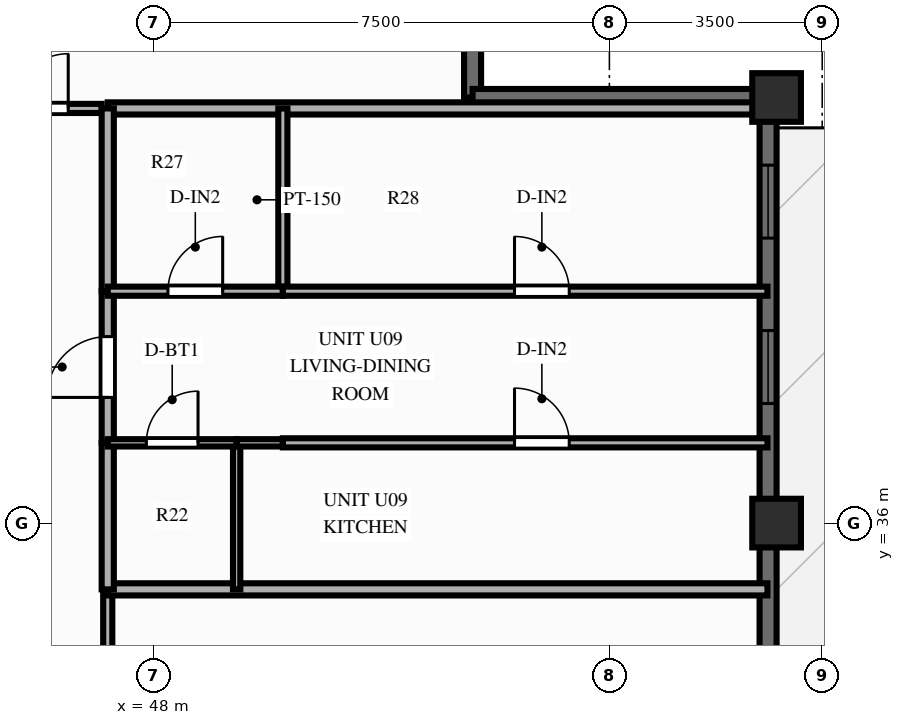
"""IFC4 building model, lengths in metres.
Left out: names, types, materials, properties, quantities, classifications, styles, units other than length and angle.
Written with IfcOpenShell. Run it as: python <this file> out.ifc"""

import sys

from ifc_helpers import new_model, si_unit, direction, frame, frame_2d, origin, origin_2d, place, context, subcontext, project, spatial, rectangle, extrude, source, transform, mapped, element, fill, save


model = new_model("IFC4")
c1 = context("Model", 3, precision=1e-05, world=origin(), true_north=direction((0.0, 1.0)))
c2 = subcontext(c1, "Body", "Model", "MODEL_VIEW")
j1 = project(units=[si_unit("LENGTHUNIT", "METRE"), si_unit("PLANEANGLEUNIT", "RADIAN")], contexts=[c1])
p1 = place(None, origin())
s1 = spatial("IfcSite", under=j1, at=p1, CompositionType="ELEMENT")
p2 = place(p1, origin())
s2 = spatial("IfcBuilding", under=s1, at=p2, CompositionType="ELEMENT")
p3 = place(p2, frame((0.0, 0.0, 192.7)))
s3 = spatial("IfcBuildingStorey", under=s2, at=p3, CompositionType="ELEMENT", Elevation=192.7)
m1 = source(origin(), c2, "Body", "SweptSolid", [
    extrude(rectangle(XDim=0.8, YDim=0.8, at=origin_2d()), origin(), (0.0, 0.0, 1.0), 3.9),
])
for number, where, z_axis, x_axis in (
    (1, (58.25, 36.0, 0.0), (0.0, 0.0, 1.0), (1.0, 0.0, 0.0)),
    (2, (58.25, 43.0, 0.0), (0.0, 0.0, 1.0), (1.0, 0.0, 0.0)),
):
    element("IfcColumn", number, at=place(p3, frame(where, z_axis=z_axis, x_axis=x_axis)), inside=s3, PredefinedType="COLUMN", context=c2, shape_type="MappedRepresentation", body=[
        mapped(m1, transform((0.0, 0.0, 0.0), scale=1.0)),
    ])
p4 = place(p3, frame((58.11, 11.0, 0.0), z_axis=(0.0, 0.0, 1.0), x_axis=(0.0, 1.0, 0.0)))
e3 = element("IfcWall", 3, at=p4, inside=s3, PredefinedType="SOLIDWALL", context=c2, shape_type="SweptSolid", body=[
    extrude(rectangle(XDim=32.0, YDim=0.28, at=frame_2d((16.0, 0.0))), origin(), (0.0, 0.0, 1.0), 2.44),
])
p5 = place(p4, frame((2.9, 0.0, 0.25)))
e4 = element("IfcOpeningElement", 4, at=p5, cuts=e3, PredefinedType="OPENING", context=c2, shape_type="SweptSolid", body=[
    extrude(rectangle(XDim=1.2, YDim=1.5, at=frame_2d((0.6, 0.75))), frame((0.0, 0.152, 0.0), z_axis=(0.0, -1.0, 0.0), x_axis=(1.0, 0.0, 0.0)), (0.0, 0.0, 1.0), 0.304),
])
p6 = place(p4, frame((8.597, 0.0, 0.25)))
e5 = element("IfcOpeningElement", 5, at=p6, cuts=e3, PredefinedType="OPENING", context=c2, shape_type="SweptSolid", body=[
    extrude(rectangle(XDim=1.2, YDim=1.5, at=frame_2d((0.6, 0.75))), frame((0.0, 0.152, 0.0), z_axis=(0.0, -1.0, 0.0), x_axis=(1.0, 0.0, 0.0)), (0.0, 0.0, 1.0), 0.304),
])
p7 = place(p4, frame((11.05, 0.0, 0.25)))
e6 = element("IfcOpeningElement", 6, at=p7, cuts=e3, PredefinedType="OPENING", context=c2, shape_type="SweptSolid", body=[
    extrude(rectangle(XDim=1.2, YDim=1.5, at=frame_2d((0.6, 0.75))), frame((0.0, 0.152, 0.0), z_axis=(0.0, -1.0, 0.0), x_axis=(1.0, 0.0, 0.0)), (0.0, 0.0, 1.0), 0.304),
])
p8 = place(p4, frame((13.897, 0.0, 0.25)))
e7 = element("IfcOpeningElement", 7, at=p8, cuts=e3, PredefinedType="OPENING", context=c2, shape_type="SweptSolid", body=[
    extrude(rectangle(XDim=1.2, YDim=1.5, at=frame_2d((0.6, 0.75))), frame((0.0, 0.152, 0.0), z_axis=(0.0, -1.0, 0.0), x_axis=(1.0, 0.0, 0.0)), (0.0, 0.0, 1.0), 0.304),
])
p9 = place(p4, frame((20.755, 0.0, 0.0), z_axis=(0.0, 0.0, 1.0), x_axis=(-1.0, 0.0, 0.0)))
e8 = element("IfcOpeningElement", 8, at=p9, cuts=e3, PredefinedType="OPENING", context=c2, shape_type="SweptSolid", body=[
    extrude(rectangle(XDim=1.6, YDim=2.15, at=frame_2d((0.8, 1.075))), frame((0.0, 0.152, 0.0), z_axis=(0.0, -1.0, 0.0), x_axis=(1.0, 0.0, 0.0)), (0.0, 0.0, 1.0), 0.304),
])
p10 = place(p4, frame((26.967, 0.0, 0.25)))
e9 = element("IfcOpeningElement", 9, at=p10, cuts=e3, PredefinedType="OPENING", context=c2, shape_type="SweptSolid", body=[
    extrude(rectangle(XDim=1.2, YDim=1.5, at=frame_2d((0.6, 0.75))), frame((0.0, 0.152, 0.0), z_axis=(0.0, -1.0, 0.0), x_axis=(1.0, 0.0, 0.0)), (0.0, 0.0, 1.0), 0.304),
])
p11 = place(p4, frame((29.687, 0.0, 0.25)))
e10 = element("IfcOpeningElement", 10, at=p11, cuts=e3, PredefinedType="OPENING", context=c2, shape_type="SweptSolid", body=[
    extrude(rectangle(XDim=1.2, YDim=1.5, at=frame_2d((0.6, 0.75))), frame((0.0, 0.152, 0.0), z_axis=(0.0, -1.0, 0.0), x_axis=(1.0, 0.0, 0.0)), (0.0, 0.0, 1.0), 0.304),
])
for number, where, z_axis, x_axis in (
    (11, (53.25, 43.0, 0.0), (0.0, 0.0, 1.0), (0.0, 1.0, 0.0)),
    (12, (53.25, 43.0, 0.0), (0.0, 0.0, 1.0), (1.0, 0.0, 0.0)),
):
    element("IfcWall", number, at=place(p3, frame(where, z_axis=z_axis, x_axis=x_axis)), inside=s3, PredefinedType="SOLIDWALL", context=c2, shape_type="SweptSolid", body=[
        extrude(rectangle(XDim=4.92, YDim=0.28, at=frame_2d((2.46, 0.0))), origin(), (0.0, 0.0, 1.0), 2.44),
    ])
p12 = place(p3, frame((44.82, 42.82, 0.0), z_axis=(0.0, 0.0, 1.0), x_axis=(1.0, 0.0, 0.0)))
e13 = element("IfcWall", 13, at=p12, inside=s3, PredefinedType="PARTITIONING", context=c2, shape_type="SweptSolid", body=[
    extrude(rectangle(XDim=2.33, YDim=0.15, at=frame_2d((1.165, 0.0))), origin(), (0.0, 0.0, 1.0), 2.24),
])
p13 = place(p12, frame((0.88, 0.0, 0.0)))
e14 = element("IfcOpeningElement", 14, at=p13, cuts=e13, PredefinedType="OPENING", context=c2, shape_type="SweptSolid", body=[
    extrude(rectangle(XDim=0.9, YDim=2.1, at=frame_2d((0.45, 1.05))), frame((0.0, 0.087, 0.0), z_axis=(0.0, -1.0, 0.0), x_axis=(1.0, 0.0, 0.0)), (0.0, 0.0, 1.0), 0.174),
])
p14 = place(p3, frame((47.25, 42.82, 0.0), z_axis=(0.0, 0.0, 1.0), x_axis=(1.0, 0.0, 0.0)))
e15 = element("IfcWall", 15, at=p14, inside=s3, PredefinedType="PARTITIONING", context=c2, shape_type="SweptSolid", body=[
    extrude(rectangle(XDim=10.85, YDim=0.2, at=frame_2d((5.425, 0.0))), origin(), (0.0, 0.0, 1.0), 2.24),
])
p15 = place(p3, frame((47.25, 27.0, 0.0), z_axis=(0.0, 0.0, 1.0), x_axis=(0.0, 1.0, 0.0)))
e16 = element("IfcWall", 16, at=p15, inside=s3, PredefinedType="PARTITIONING", context=c2, shape_type="SweptSolid", body=[
    extrude(rectangle(XDim=7.91, YDim=0.15, at=frame_2d((3.955, 0.0))), origin(), (0.0, 0.0, 1.0), 3.56),
])
p16 = place(p15, frame((3.405, 0.0, 0.0)))
e17 = element("IfcOpeningElement", 17, at=p16, cuts=e16, PredefinedType="OPENING", context=c2, shape_type="SweptSolid", body=[
    extrude(rectangle(XDim=1.1, YDim=2.15, at=frame_2d((0.55, 1.075))), frame((0.0, 0.087, 0.0), z_axis=(0.0, -1.0, 0.0), x_axis=(1.0, 0.0, 0.0)), (0.0, 0.0, 1.0), 0.174),
])
p17 = place(p3, frame((47.25, 34.91, 0.0), z_axis=(0.0, 0.0, 1.0), x_axis=(1.0, 0.0, 0.0)))
e18 = element("IfcWall", 18, at=p17, inside=s3, PredefinedType="PARTITIONING", context=c2, shape_type="SweptSolid", body=[
    extrude(rectangle(XDim=10.85, YDim=0.2, at=frame_2d((5.425, 0.0))), origin(), (0.0, 0.0, 1.0), 3.56),
])
p18 = place(p3, frame((47.25, 34.91, 0.0), z_axis=(0.0, 0.0, 1.0), x_axis=(0.0, 1.0, 0.0)))
e19 = element("IfcWall", 19, at=p18, inside=s3, PredefinedType="PARTITIONING", context=c2, shape_type="SweptSolid", body=[
    extrude(rectangle(XDim=2.41, YDim=0.2, at=frame_2d((1.205, 0.0))), origin(), (0.0, 0.0, 1.0), 3.56),
])
p19 = place(p3, frame((47.25, 37.32, 0.0), z_axis=(0.0, 0.0, 1.0), x_axis=(0.0, 1.0, 0.0)))
e20 = element("IfcWall", 20, at=p19, inside=s3, PredefinedType="PARTITIONING", context=c2, shape_type="SweptSolid", body=[
    extrude(rectangle(XDim=2.494, YDim=0.2, at=frame_2d((1.247, 0.0))), origin(), (0.0, 0.0, 1.0), 3.56),
])
p20 = place(p19, frame((0.747, 0.0, 0.0)))
e21 = element("IfcOpeningElement", 21, at=p20, cuts=e20, PredefinedType="OPENING", context=c2, shape_type="SweptSolid", body=[
    extrude(rectangle(XDim=1.0, YDim=2.15, at=frame_2d((0.5, 1.075))), frame((0.0, 0.112, 0.0), z_axis=(0.0, -1.0, 0.0), x_axis=(1.0, 0.0, 0.0)), (0.0, 0.0, 1.0), 0.224),
])
p21 = place(p3, frame((47.25, 39.814, 0.0), z_axis=(0.0, 0.0, 1.0), x_axis=(0.0, 1.0, 0.0)))
e22 = element("IfcWall", 22, at=p21, inside=s3, PredefinedType="PARTITIONING", context=c2, shape_type="SweptSolid", body=[
    extrude(rectangle(XDim=3.006, YDim=0.2, at=frame_2d((1.503, 0.0))), origin(), (0.0, 0.0, 1.0), 3.56),
])
p22 = place(p3, frame((49.37, 34.91, 0.0), z_axis=(0.0, 0.0, 1.0), x_axis=(0.0, 1.0, 0.0)))
e23 = element("IfcWall", 23, at=p22, inside=s3, PredefinedType="PARTITIONING", context=c2, shape_type="SweptSolid", body=[
    extrude(rectangle(XDim=2.41, YDim=0.12, at=frame_2d((1.205, 0.0))), origin(), (0.0, 0.0, 1.0), 3.56),
])
p23 = place(p3, frame((50.13, 39.814, 0.0), z_axis=(0.0, 0.0, 1.0), x_axis=(0.0, 1.0, 0.0)))
e24 = element("IfcWall", 24, at=p23, inside=s3, PredefinedType="PARTITIONING", context=c2, shape_type="SweptSolid", body=[
    extrude(rectangle(XDim=3.006, YDim=0.15, at=frame_2d((1.503, 0.0))), origin(), (0.0, 0.0, 1.0), 3.56),
])
p24 = place(p3, frame((47.25, 37.32, 0.0), z_axis=(0.0, 0.0, 1.0), x_axis=(1.0, 0.0, 0.0)))
e25 = element("IfcWall", 25, at=p24, inside=s3, PredefinedType="PARTITIONING", context=c2, shape_type="SweptSolid", body=[
    extrude(rectangle(XDim=2.12, YDim=0.12, at=frame_2d((1.06, 0.0))), origin(), (0.0, 0.0, 1.0), 3.56),
])
p25 = place(p24, frame((0.635, 0.0, 0.0)))
e26 = element("IfcOpeningElement", 26, at=p25, cuts=e25, PredefinedType="OPENING", context=c2, shape_type="SweptSolid", body=[
    extrude(rectangle(XDim=0.85, YDim=2.05, at=frame_2d((0.425, 1.025))), frame((0.0, 0.072, 0.0), z_axis=(0.0, -1.0, 0.0), x_axis=(1.0, 0.0, 0.0)), (0.0, 0.0, 1.0), 0.144),
])
p26 = place(p3, frame((49.37, 37.32, 0.0), z_axis=(0.0, 0.0, 1.0), x_axis=(1.0, 0.0, 0.0)))
e27 = element("IfcWall", 27, at=p26, inside=s3, PredefinedType="PARTITIONING", context=c2, shape_type="SweptSolid", body=[
    extrude(rectangle(XDim=0.76, YDim=0.12, at=frame_2d((0.38, 0.0))), origin(), (0.0, 0.0, 1.0), 3.56),
])
p27 = place(p3, frame((50.13, 37.32, 0.0), z_axis=(0.0, 0.0, 1.0), x_axis=(1.0, 0.0, 0.0)))
e28 = element("IfcWall", 28, at=p27, inside=s3, PredefinedType="PARTITIONING", context=c2, shape_type="SweptSolid", body=[
    extrude(rectangle(XDim=7.97, YDim=0.15, at=frame_2d((3.985, 0.0))), origin(), (0.0, 0.0, 1.0), 3.56),
])
p28 = place(p27, frame((3.81, 0.0, 0.0)))
e29 = element("IfcOpeningElement", 29, at=p28, cuts=e28, PredefinedType="OPENING", context=c2, shape_type="SweptSolid", body=[
    extrude(rectangle(XDim=0.9, YDim=2.1, at=frame_2d((0.45, 1.05))), frame((0.0, 0.087, 0.0), z_axis=(0.0, -1.0, 0.0), x_axis=(1.0, 0.0, 0.0)), (0.0, 0.0, 1.0), 0.174),
])
p29 = place(p3, frame((47.25, 39.814, 0.0), z_axis=(0.0, 0.0, 1.0), x_axis=(1.0, 0.0, 0.0)))
e30 = element("IfcWall", 30, at=p29, inside=s3, PredefinedType="PARTITIONING", context=c2, shape_type="SweptSolid", body=[
    extrude(rectangle(XDim=2.88, YDim=0.15, at=frame_2d((1.44, 0.0))), origin(), (0.0, 0.0, 1.0), 3.56),
])
p30 = place(p29, frame((0.99, 0.0, 0.0)))
e31 = element("IfcOpeningElement", 31, at=p30, cuts=e30, PredefinedType="OPENING", context=c2, shape_type="SweptSolid", body=[
    extrude(rectangle(XDim=0.9, YDim=2.1, at=frame_2d((0.45, 1.05))), frame((0.0, 0.087, 0.0), z_axis=(0.0, -1.0, 0.0), x_axis=(1.0, 0.0, 0.0)), (0.0, 0.0, 1.0), 0.174),
])
p31 = place(p3, frame((50.13, 39.814, 0.0), z_axis=(0.0, 0.0, 1.0), x_axis=(1.0, 0.0, 0.0)))
e32 = element("IfcWall", 32, at=p31, inside=s3, PredefinedType="PARTITIONING", context=c2, shape_type="SweptSolid", body=[
    extrude(rectangle(XDim=7.97, YDim=0.15, at=frame_2d((3.985, 0.0))), origin(), (0.0, 0.0, 1.0), 3.56),
])
p32 = place(p31, frame((3.81, 0.0, 0.0)))
e33 = element("IfcOpeningElement", 33, at=p32, cuts=e32, PredefinedType="OPENING", context=c2, shape_type="SweptSolid", body=[
    extrude(rectangle(XDim=0.9, YDim=2.1, at=frame_2d((0.45, 1.05))), frame((0.0, 0.087, 0.0), z_axis=(0.0, -1.0, 0.0), x_axis=(1.0, 0.0, 0.0)), (0.0, 0.0, 1.0), 0.174),
])
m2 = source(origin(), c2, "Body", "SweptSolid", [
    extrude(rectangle(XDim=1.2, YDim=1.5, at=frame_2d((0.6, 0.75))), frame((0.0, 0.03, 0.0), z_axis=(0.0, -1.0, 0.0), x_axis=(1.0, 0.0, 0.0)), (0.0, 0.0, 1.0), 0.06),
])
p33 = place(p10, origin())
e34 = element("IfcWindow", 34, at=p33, inside=s3, PartitioningType="SINGLE_PANEL", PredefinedType="WINDOW", context=c2, shape_type="MappedRepresentation", body=[
    mapped(m2, transform((0.0, 0.0, 0.0), scale=1.0)),
])
fill(e9, e34)
p34 = place(p11, origin())
e35 = element("IfcWindow", 35, at=p34, inside=s3, PartitioningType="SINGLE_PANEL", PredefinedType="WINDOW", context=c2, shape_type="MappedRepresentation", body=[
    mapped(m2, transform((0.0, 0.0, 0.0), scale=1.0)),
])
fill(e10, e35)
m3 = source(origin(), c2, "Body", "SweptSolid", [
    extrude(rectangle(XDim=0.9, YDim=2.1, at=frame_2d((0.45, 1.05))), frame((0.0, 0.025, 0.0), z_axis=(0.0, -1.0, 0.0), x_axis=(1.0, 0.0, 0.0)), (0.0, 0.0, 1.0), 0.05),
])
p35 = place(p13, origin())
e36 = element("IfcDoor", 36, at=p35, inside=s3, OperationType="SINGLE_SWING_RIGHT", PredefinedType="DOOR", context=c2, shape_type="MappedRepresentation", body=[
    mapped(m3, transform((0.0, 0.0, 0.0), scale=1.0)),
])
fill(e14, e36)
m4 = source(origin(), c2, "Body", "SweptSolid", [
    extrude(rectangle(XDim=1.0, YDim=2.15, at=frame_2d((0.5, 1.075))), frame((0.0, 0.025, 0.0), z_axis=(0.0, -1.0, 0.0), x_axis=(1.0, 0.0, 0.0)), (0.0, 0.0, 1.0), 0.05),
])
p36 = place(p20, origin())
e37 = element("IfcDoor", 37, at=p36, inside=s3, OperationType="SINGLE_SWING_LEFT", PredefinedType="DOOR", context=c2, shape_type="MappedRepresentation", body=[
    mapped(m4, transform((0.0, 0.0, 0.0), scale=1.0)),
])
fill(e21, e37)
m5 = source(origin(), c2, "Body", "SweptSolid", [
    extrude(rectangle(XDim=0.85, YDim=2.05, at=frame_2d((0.425, 1.025))), frame((0.0, 0.025, 0.0), z_axis=(0.0, -1.0, 0.0), x_axis=(1.0, 0.0, 0.0)), (0.0, 0.0, 1.0), 0.05),
])
p37 = place(p25, origin())
e38 = element("IfcDoor", 38, at=p37, inside=s3, OperationType="SINGLE_SWING_RIGHT", PredefinedType="DOOR", context=c2, shape_type="MappedRepresentation", body=[
    mapped(m5, transform((0.0, 0.0, 0.0), scale=1.0)),
])
fill(e26, e38)
p38 = place(p28, origin())
e39 = element("IfcDoor", 39, at=p38, inside=s3, OperationType="SINGLE_SWING_LEFT", PredefinedType="DOOR", context=c2, shape_type="MappedRepresentation", body=[
    mapped(m3, transform((0.0, 0.0, 0.0), scale=1.0)),
])
fill(e29, e39)
p39 = place(p30, origin())
e40 = element("IfcDoor", 40, at=p39, inside=s3, OperationType="SINGLE_SWING_RIGHT", PredefinedType="DOOR", context=c2, shape_type="MappedRepresentation", body=[
    mapped(m3, transform((0.0, 0.0, 0.0), scale=1.0)),
])
fill(e31, e40)
p40 = place(p32, origin())
e41 = element("IfcDoor", 41, at=p40, inside=s3, OperationType="SINGLE_SWING_LEFT", PredefinedType="DOOR", context=c2, shape_type="MappedRepresentation", body=[
    mapped(m3, transform((0.0, 0.0, 0.0), scale=1.0)),
])
fill(e33, e41)
save(model, sys.argv[1])
